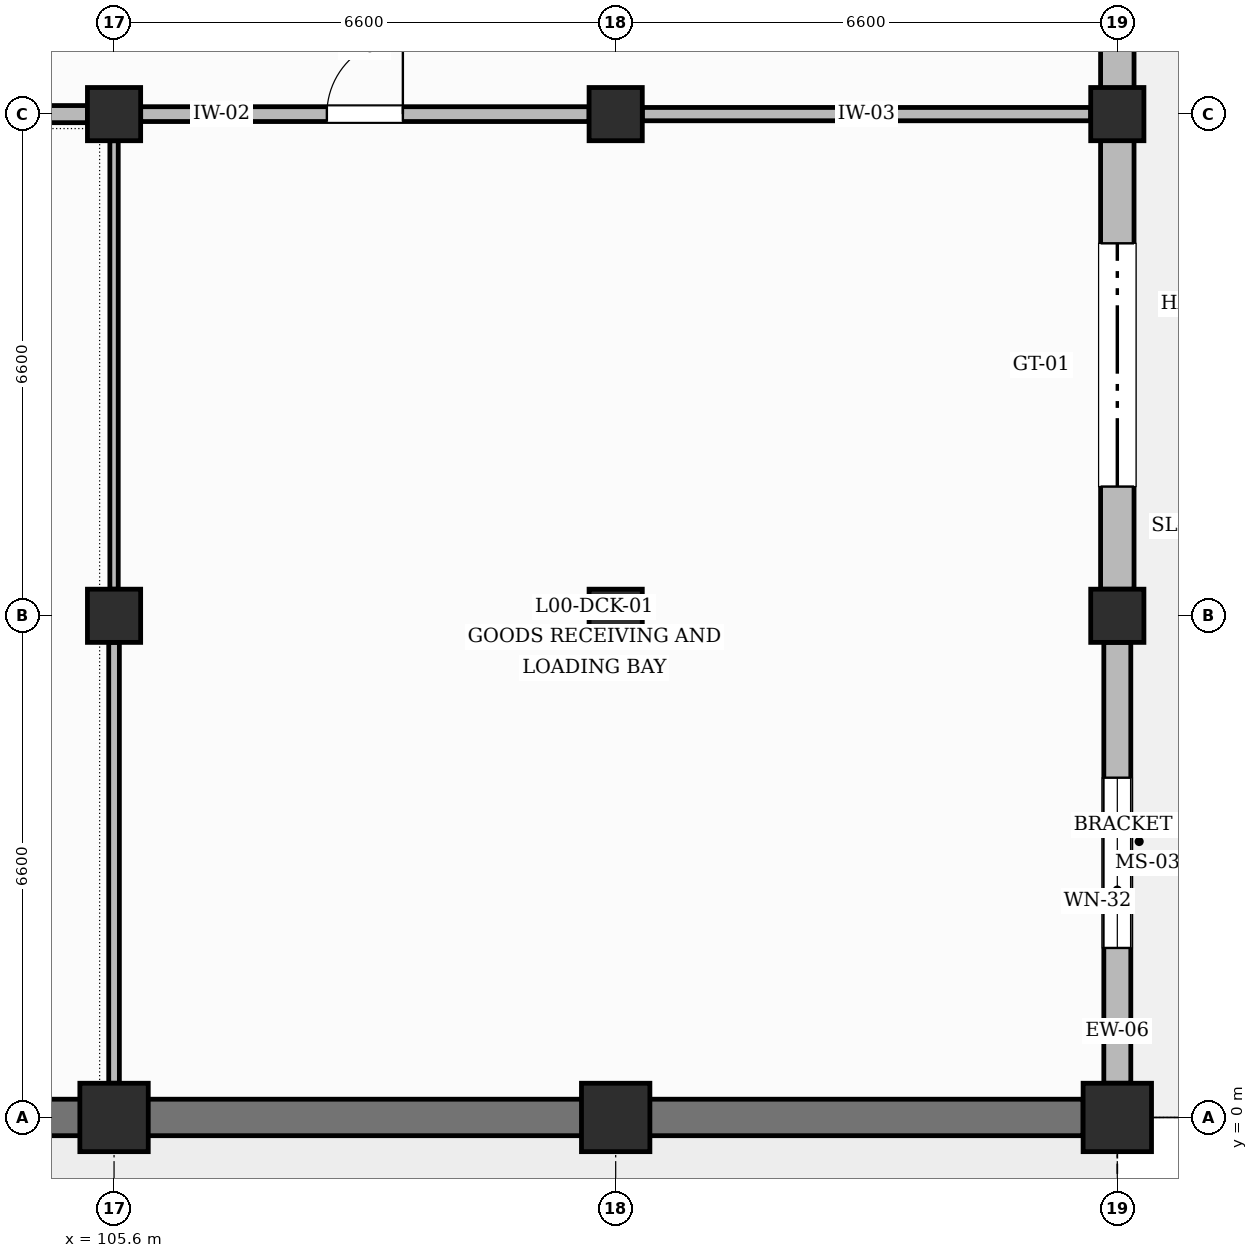
"""IFC4 building model, lengths in metres.
Left out: names, types, materials, properties, quantities, classifications, styles, units other than length and angle.
Written with IfcOpenShell. Run it as: python <this file> out.ifc"""

import sys

from ifc_helpers import new_model, si_unit, direction, frame, frame_2d, origin, origin_2d, place, context, subcontext, project, spatial, rectangle, circle, extrude, element, fill, save


model = new_model("IFC4")
c1 = context("Model", 3, precision=1e-05, world=origin(), true_north=direction((0.0, 1.0)))
c2 = subcontext(c1, "Body", "Model", "MODEL_VIEW")
j1 = project(units=[si_unit("LENGTHUNIT", "METRE"), si_unit("PLANEANGLEUNIT", "RADIAN")], contexts=[c1])
p1 = place(None, origin())
s1 = spatial("IfcSite", under=j1, at=p1, CompositionType="ELEMENT")
p2 = place(p1, origin())
s2 = spatial("IfcBuilding", under=s1, at=p2, CompositionType="ELEMENT")
p3 = place(p2, origin())
s3 = spatial("IfcBuildingStorey", under=s2, at=p3, CompositionType="ELEMENT", Elevation=0.0)
p4 = place(p3, frame((105.6, 0.0, 0.0), z_axis=(0.0, 0.0, 1.0), x_axis=(1.0, 0.0, 0.0)))
e1 = element("IfcColumn", 1, at=p4, inside=s3, PredefinedType="COLUMN", context=c2, shape_type="SweptSolid", body=[
    extrude(rectangle(XDim=0.9, YDim=0.9, at=origin_2d()), origin(), (0.0, 0.0, 1.0), 5.4),
])
for number, where, z_axis, x_axis in (
    (2, (105.6, 6.6, 0.0), (0.0, 0.0, 1.0), (1.0, 0.0, 0.0)),
    (3, (105.6, 13.2, 0.0), (0.0, 0.0, 1.0), (1.0, 0.0, 0.0)),
):
    element("IfcColumn", number, at=place(p3, frame(where, z_axis=z_axis, x_axis=x_axis)), inside=s3, PredefinedType="COLUMN", context=c2, shape_type="SweptSolid", body=[
        extrude(circle(Radius=0.35, at=origin_2d()), origin(), (0.0, 0.0, 1.0), 5.4),
    ])
p5 = place(p3, frame((112.2, 0.0, 0.0), z_axis=(0.0, 0.0, 1.0), x_axis=(1.0, 0.0, 0.0)))
e4 = element("IfcColumn", 4, at=p5, inside=s3, PredefinedType="COLUMN", context=c2, shape_type="SweptSolid", body=[
    extrude(rectangle(XDim=0.9, YDim=0.9, at=origin_2d()), origin(), (0.0, 0.0, 1.0), 5.4),
])
for number, where, z_axis, x_axis in (
    (5, (112.2, 6.6, 0.0), (0.0, 0.0, 1.0), (1.0, 0.0, 0.0)),
    (6, (112.2, 13.2, 0.0), (0.0, 0.0, 1.0), (1.0, 0.0, 0.0)),
):
    element("IfcColumn", number, at=place(p3, frame(where, z_axis=z_axis, x_axis=x_axis)), inside=s3, PredefinedType="COLUMN", context=c2, shape_type="SweptSolid", body=[
        extrude(circle(Radius=0.35, at=origin_2d()), origin(), (0.0, 0.0, 1.0), 5.4),
    ])
p6 = place(p3, frame((118.8, 0.0, 0.0), z_axis=(0.0, 0.0, 1.0), x_axis=(1.0, 0.0, 0.0)))
e7 = element("IfcColumn", 7, at=p6, inside=s3, PredefinedType="COLUMN", context=c2, shape_type="SweptSolid", body=[
    extrude(rectangle(XDim=0.9, YDim=0.9, at=origin_2d()), origin(), (0.0, 0.0, 1.0), 5.4),
])
for number, where, z_axis, x_axis in (
    (8, (118.8, 6.6, 0.0), (0.0, 0.0, 1.0), (1.0, 0.0, 0.0)),
    (9, (118.8, 13.2, 0.0), (0.0, 0.0, 1.0), (1.0, 0.0, 0.0)),
):
    element("IfcColumn", number, at=place(p3, frame(where, z_axis=z_axis, x_axis=x_axis)), inside=s3, PredefinedType="COLUMN", context=c2, shape_type="SweptSolid", body=[
        extrude(circle(Radius=0.35, at=origin_2d()), origin(), (0.0, 0.0, 1.0), 5.4),
    ])
for number, where, z_axis, x_axis in (
    (10, (99.45, 0.0, 0.0), (0.0, 0.0, 1.0), (1.0, 0.0, 0.0)),
    (11, (106.05, 0.0, 0.0), (0.0, 0.0, 1.0), (1.0, 0.0, 0.0)),
):
    element("IfcWall", number, at=place(p3, frame(where, z_axis=z_axis, x_axis=x_axis)), inside=s3, PredefinedType="SOLIDWALL", context=c2, shape_type="SweptSolid", body=[
        extrude(rectangle(XDim=5.7, YDim=0.48, at=frame_2d((2.85, 0.0))), origin(), (0.0, 0.0, 1.0), 4.45),
    ])
p7 = place(p3, frame((112.65, 0.0, 0.0), z_axis=(0.0, 0.0, 1.0), x_axis=(1.0, 0.0, 0.0)))
e12 = element("IfcWall", 12, at=p7, inside=s3, PredefinedType="SOLIDWALL", context=c2, shape_type="SweptSolid", body=[
    extrude(rectangle(XDim=5.7, YDim=0.48, at=frame_2d((2.85, 0.0))), origin(), (0.0, 0.0, 1.0), 4.45),
])
p8 = place(p3, frame((118.8, 0.45, 0.0), z_axis=(0.0, 0.0, 1.0), x_axis=(0.0, 1.0, 0.0)))
e13 = element("IfcWall", 13, at=p8, inside=s3, PredefinedType="SOLIDWALL", context=c2, shape_type="SweptSolid", body=[
    extrude(rectangle(XDim=5.8, YDim=0.355, at=frame_2d((2.9, 0.0))), origin(), (0.0, 0.0, 1.0), 4.45),
])
p9 = place(p8, frame((1.78, 0.0, 0.95)))
e14 = element("IfcOpeningElement", 14, at=p9, cuts=e13, PredefinedType="OPENING", context=c2, shape_type="SweptSolid", body=[
    extrude(rectangle(XDim=2.24, YDim=1.96, at=frame_2d((1.12, 0.98))), frame((0.0, 0.188, 0.0), z_axis=(0.0, -1.0, 0.0), x_axis=(1.0, 0.0, 0.0)), (0.0, 0.0, 1.0), 0.375),
])
p10 = place(p3, frame((118.8, 6.95, 0.0), z_axis=(0.0, 0.0, 1.0), x_axis=(0.0, 1.0, 0.0)))
e15 = element("IfcWall", 15, at=p10, inside=s3, PredefinedType="SOLIDWALL", context=c2, shape_type="SweptSolid", body=[
    extrude(rectangle(XDim=5.9, YDim=0.44, at=frame_2d((2.95, 0.0))), origin(), (0.0, 0.0, 1.0), 4.45),
])
p11 = place(p10, frame((1.35, 0.0, 0.0)))
e16 = element("IfcOpeningElement", 16, at=p11, cuts=e15, PredefinedType="OPENING", context=c2, shape_type="SweptSolid", body=[
    extrude(rectangle(XDim=3.2, YDim=3.1, at=frame_2d((1.6, 1.55))), frame((0.0, 0.23, 0.0), z_axis=(0.0, -1.0, 0.0), x_axis=(1.0, 0.0, 0.0)), (0.0, 0.0, 1.0), 0.46),
])
p12 = place(p3, frame((118.8, 13.55, 0.0), z_axis=(0.0, 0.0, 1.0), x_axis=(0.0, 1.0, 0.0)))
e17 = element("IfcWall", 17, at=p12, inside=s3, PredefinedType="SOLIDWALL", context=c2, shape_type="SweptSolid", body=[
    extrude(rectangle(XDim=5.9, YDim=0.44, at=frame_2d((2.95, 0.0))), origin(), (0.0, 0.0, 1.0), 4.45),
])
p13 = place(p12, frame((2.025, 0.0, 0.0)))
e18 = element("IfcOpeningElement", 18, at=p13, cuts=e17, PredefinedType="OPENING", context=c2, shape_type="SweptSolid", body=[
    extrude(rectangle(XDim=1.85, YDim=2.35, at=frame_2d((0.925, 1.175))), frame((0.0, 0.23, 0.0), z_axis=(0.0, -1.0, 0.0), x_axis=(1.0, 0.0, 0.0)), (0.0, 0.0, 1.0), 0.46),
])
p14 = place(p3, frame((105.6, 0.45, 0.0), z_axis=(0.0, 0.0, 1.0), x_axis=(0.0, 1.0, 0.0)))
e19 = element("IfcWall", 19, at=p14, inside=s3, PredefinedType="PARTITIONING", context=c2, shape_type="SweptSolid", body=[
    extrude(rectangle(XDim=5.8, YDim=0.14, at=frame_2d((2.9, 0.0))), origin(), (0.0, 0.0, 1.0), 4.3),
])
p15 = place(p3, frame((105.6, 6.95, 0.0), z_axis=(0.0, 0.0, 1.0), x_axis=(0.0, 1.0, 0.0)))
e20 = element("IfcWall", 20, at=p15, inside=s3, PredefinedType="PARTITIONING", context=c2, shape_type="SweptSolid", body=[
    extrude(rectangle(XDim=5.9, YDim=0.11, at=frame_2d((2.95, 0.0))), origin(), (0.0, 0.0, 1.0), 4.3),
])
p16 = place(p3, frame((99.35, 13.2, 0.0), z_axis=(0.0, 0.0, 1.0), x_axis=(1.0, 0.0, 0.0)))
e21 = element("IfcWall", 21, at=p16, inside=s3, PredefinedType="PARTITIONING", context=c2, shape_type="SweptSolid", body=[
    extrude(rectangle(XDim=5.9, YDim=0.225, at=frame_2d((2.95, 0.0))), origin(), (0.0, 0.0, 1.0), 4.3),
])
p17 = place(p3, frame((105.95, 13.2, 0.0), z_axis=(0.0, 0.0, 1.0), x_axis=(1.0, 0.0, 0.0)))
e22 = element("IfcWall", 22, at=p17, inside=s3, PredefinedType="PARTITIONING", context=c2, shape_type="SweptSolid", body=[
    extrude(rectangle(XDim=5.9, YDim=0.195, at=frame_2d((2.95, 0.0))), origin(), (0.0, 0.0, 1.0), 4.2),
])
p18 = place(p17, frame((2.45, 0.0, 0.0)))
e23 = element("IfcOpeningElement", 23, at=p18, cuts=e22, PredefinedType="OPENING", context=c2, shape_type="SweptSolid", body=[
    extrude(rectangle(XDim=1.0, YDim=2.1, at=frame_2d((0.5, 1.05))), frame((0.0, 0.107, 0.0), z_axis=(0.0, -1.0, 0.0), x_axis=(1.0, 0.0, 0.0)), (0.0, 0.0, 1.0), 0.215),
])
p19 = place(p3, frame((112.55, 13.2, 0.0), z_axis=(0.0, 0.0, 1.0), x_axis=(1.0, 0.0, 0.0)))
e24 = element("IfcWall", 24, at=p19, inside=s3, PredefinedType="PARTITIONING", context=c2, shape_type="SweptSolid", body=[
    extrude(rectangle(XDim=5.9, YDim=0.175, at=frame_2d((2.95, 0.0))), origin(), (0.0, 0.0, 1.0), 4.3),
])
p20 = place(p9, origin())
e25 = element("IfcWindow", 25, at=p20, inside=s3, PartitioningType="DOUBLE_PANEL_VERTICAL", PredefinedType="WINDOW", context=c2, shape_type="SweptSolid", body=[
    extrude(rectangle(XDim=2.24, YDim=1.96, at=frame_2d((1.12, 0.98))), frame((0.0, 0.03, 0.0), z_axis=(0.0, -1.0, 0.0), x_axis=(1.0, 0.0, 0.0)), (0.0, 0.0, 1.0), 0.06),
])
fill(e14, e25)
p21 = place(p11, origin())
e26 = element("IfcDoor", 26, at=p21, inside=s3, OperationType="ROLLINGUP", PredefinedType="GATE", context=c2, shape_type="SweptSolid", body=[
    extrude(rectangle(XDim=3.2, YDim=3.1, at=frame_2d((1.6, 1.55))), frame((0.0, 0.025, 0.0), z_axis=(0.0, -1.0, 0.0), x_axis=(1.0, 0.0, 0.0)), (0.0, 0.0, 1.0), 0.05),
])
fill(e16, e26)
p22 = place(p18, origin())
e27 = element("IfcDoor", 27, at=p22, inside=s3, OperationType="SINGLE_SWING_RIGHT", PredefinedType="DOOR", context=c2, shape_type="SweptSolid", body=[
    extrude(rectangle(XDim=1.0, YDim=2.1, at=frame_2d((0.5, 1.05))), frame((0.0, 0.025, 0.0), z_axis=(0.0, -1.0, 0.0), x_axis=(1.0, 0.0, 0.0)), (0.0, 0.0, 1.0), 0.05),
])
fill(e23, e27)
save(model, sys.argv[1])
